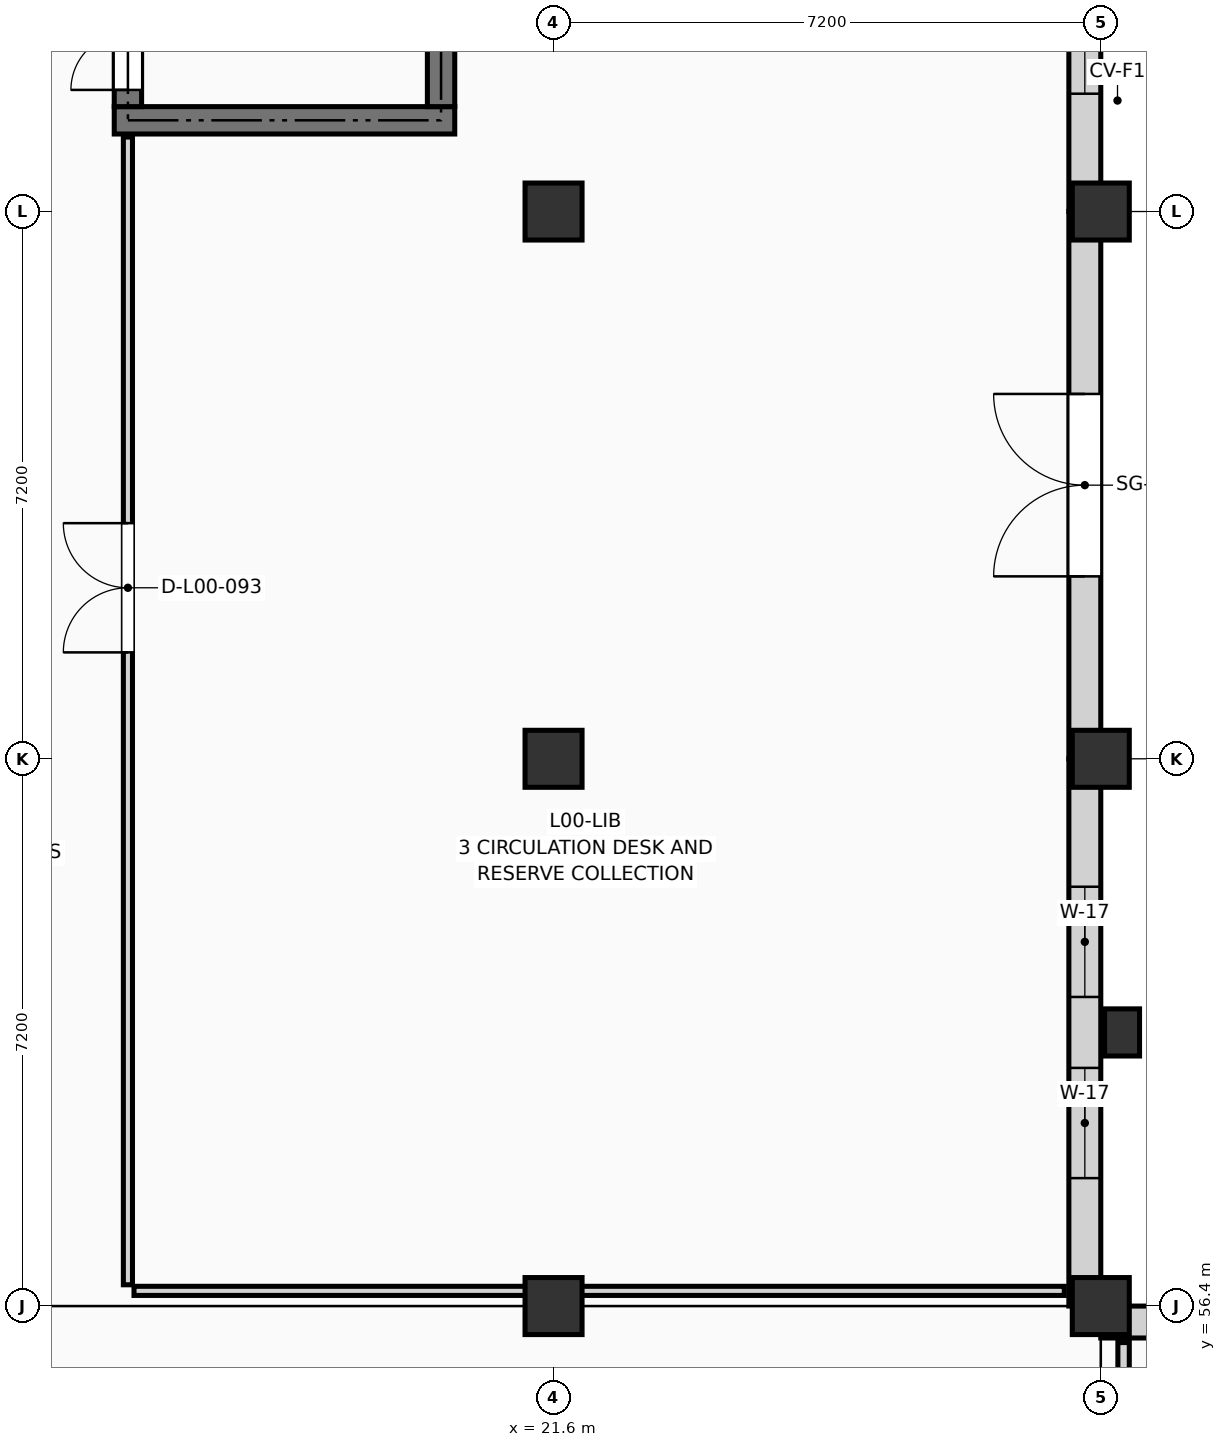
"""IFC4 building model, lengths in metres.
Left out: names, types, materials, properties, quantities, classifications, styles, units other than length and angle.
Written with IfcOpenShell. Run it as: python <this file> out.ifc"""

import sys

from ifc_helpers import new_model, si_unit, direction, frame, frame_2d, origin, origin_2d, place, context, subcontext, project, spatial, rectangle, extrude, element, fill, save


model = new_model("IFC4")
c1 = context("Model", 3, precision=1e-05, world=origin(), true_north=direction((0.0, 1.0)))
c2 = subcontext(c1, "Body", "Model", "MODEL_VIEW")
j1 = project(units=[si_unit("LENGTHUNIT", "METRE"), si_unit("PLANEANGLEUNIT", "RADIAN")], contexts=[c1])
p1 = place(None, origin())
s1 = spatial("IfcSite", under=j1, at=p1, CompositionType="ELEMENT")
p2 = place(p1, origin())
s2 = spatial("IfcBuilding", under=s1, at=p2, CompositionType="ELEMENT")
p3 = place(p2, origin())
s3 = spatial("IfcBuildingStorey", under=s2, at=p3, CompositionType="ELEMENT", Elevation=0.0)
for number, where, z_axis, x_axis in (
    (1, (21.6, 56.4, 0.0), (0.0, 0.0, 1.0), (1.0, 0.0, 0.0)),
    (2, (21.6, 63.6, 0.0), (0.0, 0.0, 1.0), (1.0, 0.0, 0.0)),
    (3, (21.6, 70.8, 0.0), (0.0, 0.0, 1.0), (1.0, 0.0, 0.0)),
    (4, (28.8, 56.4, 0.0), (0.0, 0.0, 1.0), (1.0, 0.0, 0.0)),
    (5, (28.8, 63.6, 0.0), (0.0, 0.0, 1.0), (1.0, 0.0, 0.0)),
    (6, (28.8, 70.8, 0.0), (0.0, 0.0, 1.0), (1.0, 0.0, 0.0)),
):
    element("IfcColumn", number, at=place(p3, frame(where, z_axis=z_axis, x_axis=x_axis)), inside=s3, PredefinedType="COLUMN", context=c2, shape_type="SweptSolid", body=[
        extrude(rectangle(XDim=0.75, YDim=0.75, at=origin_2d()), origin(), (0.0, 0.0, 1.0), 4.5),
    ])
p4 = place(p3, frame((29.08, 60.0, 0.0), z_axis=(0.0, 0.0, 1.0), x_axis=(1.0, 0.0, 0.0)))
e7 = element("IfcColumn", 7, at=p4, inside=s3, PredefinedType="PILASTER", context=c2, shape_type="SweptSolid", body=[
    extrude(rectangle(XDim=0.46, YDim=0.62, at=origin_2d()), origin(), (0.0, 0.0, 1.0), 4.5),
])
p5 = place(p3, frame((28.59, 70.8, 0.0), z_axis=(0.0, 0.0, 1.0), x_axis=(0.0, 1.0, 0.0)))
e8 = element("IfcWall", 8, at=p5, inside=s3, PredefinedType="SOLIDWALL", context=c2, shape_type="SweptSolid", body=[
    extrude(rectangle(XDim=7.2, YDim=0.42, at=frame_2d((3.6, 0.0))), origin(), (0.0, 0.0, 1.0), 3.62),
])
p6 = place(p5, frame((1.55, 0.0, 0.45)))
e9 = element("IfcOpeningElement", 9, at=p6, cuts=e8, PredefinedType="OPENING", context=c2, shape_type="SweptSolid", body=[
    extrude(rectangle(XDim=1.65, YDim=2.6, at=frame_2d((0.825, 1.3))), frame((0.0, 0.222, 0.0), z_axis=(0.0, -1.0, 0.0), x_axis=(1.0, 0.0, 0.0)), (0.0, 0.0, 1.0), 0.444),
])
p7 = place(p5, frame((4.0, 0.0, 0.45)))
e10 = element("IfcOpeningElement", 10, at=p7, cuts=e8, PredefinedType="OPENING", context=c2, shape_type="SweptSolid", body=[
    extrude(rectangle(XDim=1.65, YDim=2.6, at=frame_2d((0.825, 1.3))), frame((0.0, 0.222, 0.0), z_axis=(0.0, -1.0, 0.0), x_axis=(1.0, 0.0, 0.0)), (0.0, 0.0, 1.0), 0.444),
])
p8 = place(p3, frame((28.59, 63.6, 0.0), z_axis=(0.0, 0.0, 1.0), x_axis=(0.0, 1.0, 0.0)))
e11 = element("IfcWall", 11, at=p8, inside=s3, PredefinedType="SOLIDWALL", context=c2, shape_type="SweptSolid", body=[
    extrude(rectangle(XDim=7.2, YDim=0.42, at=frame_2d((3.6, 0.0))), origin(), (0.0, 0.0, 1.0), 3.62),
])
p9 = place(p8, frame((2.4, 0.0, 0.0)))
e12 = element("IfcOpeningElement", 12, at=p9, cuts=e11, PredefinedType="OPENING", context=c2, shape_type="SweptSolid", body=[
    extrude(rectangle(XDim=2.4, YDim=2.6, at=frame_2d((1.2, 1.3))), frame((0.0, 0.222, 0.0), z_axis=(0.0, -1.0, 0.0), x_axis=(1.0, 0.0, 0.0)), (0.0, 0.0, 1.0), 0.444),
])
p10 = place(p3, frame((28.59, 56.4, 0.0), z_axis=(0.0, 0.0, 1.0), x_axis=(0.0, 1.0, 0.0)))
e13 = element("IfcWall", 13, at=p10, inside=s3, PredefinedType="SOLIDWALL", context=c2, shape_type="SweptSolid", body=[
    extrude(rectangle(XDim=7.2, YDim=0.42, at=frame_2d((3.6, 0.0))), origin(), (0.0, 0.0, 1.0), 3.62),
])
p11 = place(p10, frame((1.683, 0.0, 0.45)))
e14 = element("IfcOpeningElement", 14, at=p11, cuts=e13, PredefinedType="OPENING", context=c2, shape_type="SweptSolid", body=[
    extrude(rectangle(XDim=1.45, YDim=2.5, at=frame_2d((0.725, 1.25))), frame((0.0, 0.222, 0.0), z_axis=(0.0, -1.0, 0.0), x_axis=(1.0, 0.0, 0.0)), (0.0, 0.0, 1.0), 0.444),
])
p12 = place(p10, frame((4.067, 0.0, 0.45)))
e15 = element("IfcOpeningElement", 15, at=p12, cuts=e13, PredefinedType="OPENING", context=c2, shape_type="SweptSolid", body=[
    extrude(rectangle(XDim=1.45, YDim=2.5, at=frame_2d((0.725, 1.25))), frame((0.0, 0.222, 0.0), z_axis=(0.0, -1.0, 0.0), x_axis=(1.0, 0.0, 0.0)), (0.0, 0.0, 1.0), 0.444),
])
p13 = place(p3, frame((28.8, 56.19, 0.0), z_axis=(0.0, 0.0, 1.0), x_axis=(1.0, 0.0, 0.0)))
e16 = element("IfcWall", 16, at=p13, inside=s3, PredefinedType="SOLIDWALL", context=c2, shape_type="SweptSolid", body=[
    extrude(rectangle(XDim=7.2, YDim=0.42, at=frame_2d((3.6, 0.0))), origin(), (0.0, 0.0, 1.0), 3.62),
])
p14 = place(p13, frame((1.75, 0.0, 0.45)))
e17 = element("IfcOpeningElement", 17, at=p14, cuts=e16, PredefinedType="OPENING", context=c2, shape_type="SweptSolid", body=[
    extrude(rectangle(XDim=1.35, YDim=2.45, at=frame_2d((0.675, 1.225))), frame((0.0, 0.222, 0.0), z_axis=(0.0, -1.0, 0.0), x_axis=(1.0, 0.0, 0.0)), (0.0, 0.0, 1.0), 0.444),
])
p15 = place(p13, frame((4.1, 0.0, 0.45)))
e18 = element("IfcOpeningElement", 18, at=p15, cuts=e16, PredefinedType="OPENING", context=c2, shape_type="SweptSolid", body=[
    extrude(rectangle(XDim=1.35, YDim=2.45, at=frame_2d((0.675, 1.225))), frame((0.0, 0.222, 0.0), z_axis=(0.0, -1.0, 0.0), x_axis=(1.0, 0.0, 0.0)), (0.0, 0.0, 1.0), 0.444),
])
p16 = place(p3, frame((15.82, 72.0, 0.0), z_axis=(0.0, 0.0, 1.0), x_axis=(1.0, 0.0, 0.0)))
e19 = element("IfcWall", 19, at=p16, inside=s3, PredefinedType="SHEAR", context=c2, shape_type="SweptSolid", body=[
    extrude(rectangle(XDim=4.48, YDim=0.36, at=frame_2d((2.24, 0.0))), origin(), (0.0, 0.0, 1.0), 4.25),
])
p17 = place(p3, frame((16.0, 72.18, 0.0), z_axis=(0.0, 0.0, 1.0), x_axis=(0.0, 1.0, 0.0)))
e20 = element("IfcWall", 20, at=p17, inside=s3, PredefinedType="SHEAR", context=c2, shape_type="SweptSolid", body=[
    extrude(rectangle(XDim=7.24, YDim=0.36, at=frame_2d((3.62, 0.0))), origin(), (0.0, 0.0, 1.0), 4.25),
])
p18 = place(p17, frame((0.22, 0.0, 0.0)))
e21 = element("IfcOpeningElement", 21, at=p18, cuts=e20, PredefinedType="OPENING", context=c2, shape_type="SweptSolid", body=[
    extrude(rectangle(XDim=1.5, YDim=2.2, at=frame_2d((0.75, 1.1))), frame((0.0, 0.192, 0.0), z_axis=(0.0, -1.0, 0.0), x_axis=(1.0, 0.0, 0.0)), (0.0, 0.0, 1.0), 0.384),
])
p19 = place(p3, frame((20.12, 72.18, 0.0), z_axis=(0.0, 0.0, 1.0), x_axis=(0.0, 1.0, 0.0)))
e22 = element("IfcWall", 22, at=p19, inside=s3, PredefinedType="SHEAR", context=c2, shape_type="SweptSolid", body=[
    extrude(rectangle(XDim=7.24, YDim=0.36, at=frame_2d((3.62, 0.0))), origin(), (0.0, 0.0, 1.0), 4.25),
])
p20 = place(p3, frame((29.1, 45.28, 0.0), z_axis=(0.0, 0.0, 1.0), x_axis=(0.0, 1.0, 0.0)))
e23 = element("IfcWall", 23, at=p20, inside=s3, PredefinedType="PARTITIONING", context=c2, shape_type="SweptSolid", body=[
    extrude(rectangle(XDim=10.64, YDim=0.15, at=frame_2d((5.32, 0.0))), origin(), (0.0, 0.0, 1.0), 3.385),
])
p21 = place(p3, frame((16.0, 56.68, 0.0), z_axis=(0.0, 0.0, 1.0), x_axis=(0.0, 1.0, 0.0)))
e24 = element("IfcWall", 24, at=p21, inside=s3, PredefinedType="PARTITIONING", context=c2, shape_type="SweptSolid", body=[
    extrude(rectangle(XDim=15.1, YDim=0.12, at=frame_2d((7.55, 0.0))), origin(), (0.0, 0.0, 1.0), 4.235),
])
p22 = place(p21, frame((8.32, 0.0, 0.0)))
e25 = element("IfcOpeningElement", 25, at=p22, cuts=e24, PredefinedType="OPENING", context=c2, shape_type="SweptSolid", body=[
    extrude(rectangle(XDim=1.7, YDim=2.28, at=frame_2d((0.85, 1.14))), frame((0.0, 0.072, 0.0), z_axis=(0.0, -1.0, 0.0), x_axis=(1.0, 0.0, 0.0)), (0.0, 0.0, 1.0), 0.144),
])
p23 = place(p3, frame((16.08, 56.6, 0.0), z_axis=(0.0, 0.0, 1.0), x_axis=(1.0, 0.0, 0.0)))
e26 = element("IfcWall", 26, at=p23, inside=s3, PredefinedType="PARTITIONING", context=c2, shape_type="SweptSolid", body=[
    extrude(rectangle(XDim=12.24, YDim=0.12, at=frame_2d((6.12, 0.0))), origin(), (0.0, 0.0, 1.0), 3.485),
])
p24 = place(p6, origin())
e27 = element("IfcWindow", 27, at=p24, inside=s3, PartitioningType="SINGLE_PANEL", PredefinedType="WINDOW", context=c2, shape_type="SweptSolid", body=[
    extrude(rectangle(XDim=1.65, YDim=2.6, at=frame_2d((0.825, 1.3))), frame((0.0, 0.03, 0.0), z_axis=(0.0, -1.0, 0.0), x_axis=(1.0, 0.0, 0.0)), (0.0, 0.0, 1.0), 0.06),
])
fill(e9, e27)
p25 = place(p9, origin())
e28 = element("IfcDoor", 28, at=p25, inside=s3, OperationType="DOUBLE_DOOR_SINGLE_SWING", PredefinedType="GATE", context=c2, shape_type="SweptSolid", body=[
    extrude(rectangle(XDim=2.4, YDim=2.6, at=frame_2d((1.2, 1.3))), frame((0.0, 0.025, 0.0), z_axis=(0.0, -1.0, 0.0), x_axis=(1.0, 0.0, 0.0)), (0.0, 0.0, 1.0), 0.05),
])
fill(e12, e28)
p26 = place(p11, origin())
e29 = element("IfcWindow", 29, at=p26, inside=s3, PartitioningType="SINGLE_PANEL", PredefinedType="WINDOW", context=c2, shape_type="SweptSolid", body=[
    extrude(rectangle(XDim=1.45, YDim=2.5, at=frame_2d((0.725, 1.25))), frame((0.0, 0.03, 0.0), z_axis=(0.0, -1.0, 0.0), x_axis=(1.0, 0.0, 0.0)), (0.0, 0.0, 1.0), 0.06),
])
fill(e14, e29)
p27 = place(p12, origin())
e30 = element("IfcWindow", 30, at=p27, inside=s3, PartitioningType="SINGLE_PANEL", PredefinedType="WINDOW", context=c2, shape_type="SweptSolid", body=[
    extrude(rectangle(XDim=1.45, YDim=2.5, at=frame_2d((0.725, 1.25))), frame((0.0, 0.03, 0.0), z_axis=(0.0, -1.0, 0.0), x_axis=(1.0, 0.0, 0.0)), (0.0, 0.0, 1.0), 0.06),
])
fill(e15, e30)
p28 = place(p18, origin())
e31 = element("IfcDoor", 31, at=p28, inside=s3, OperationType="DOUBLE_DOOR_SINGLE_SWING", PredefinedType="DOOR", context=c2, shape_type="SweptSolid", body=[
    extrude(rectangle(XDim=1.5, YDim=2.2, at=frame_2d((0.75, 1.1))), frame((0.0, 0.025, 0.0), z_axis=(0.0, -1.0, 0.0), x_axis=(1.0, 0.0, 0.0)), (0.0, 0.0, 1.0), 0.05),
])
fill(e21, e31)
p29 = place(p22, origin())
e32 = element("IfcDoor", 32, at=p29, inside=s3, OperationType="DOUBLE_DOOR_SINGLE_SWING", PredefinedType="DOOR", context=c2, shape_type="SweptSolid", body=[
    extrude(rectangle(XDim=1.7, YDim=2.28, at=frame_2d((0.85, 1.14))), frame((0.0, 0.025, 0.0), z_axis=(0.0, -1.0, 0.0), x_axis=(1.0, 0.0, 0.0)), (0.0, 0.0, 1.0), 0.05),
])
fill(e25, e32)
save(model, sys.argv[1])
